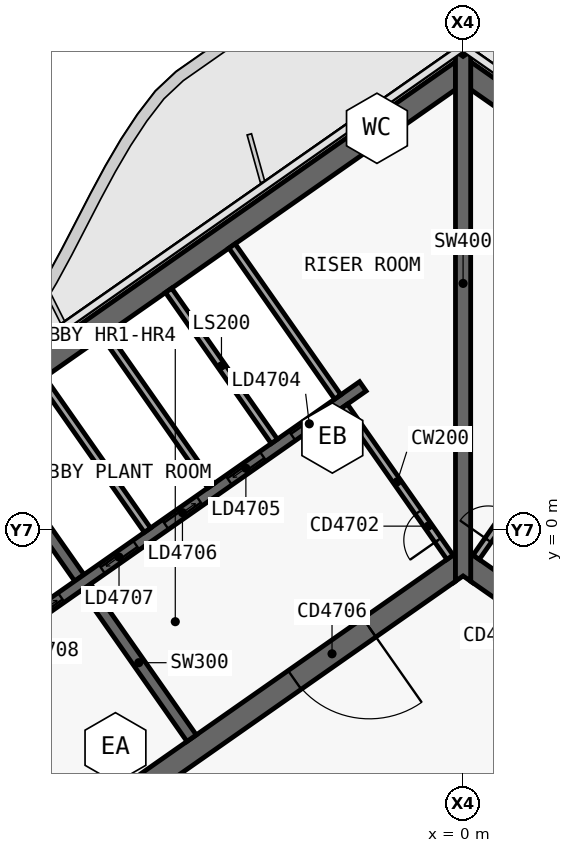
"""IFC4 building model, lengths in metres.
Left out: names, types, materials, properties, quantities, classifications, styles, units other than length and angle.
Written with IfcOpenShell. Run it as: python <this file> out.ifc"""

import sys

from ifc_helpers import new_model, si_unit, direction, frame, frame_2d, origin, place, context, subcontext, project, spatial, polyline, rectangle, outline, extrude, element, fill, save


model = new_model("IFC4")
c1 = context("Model", 3, precision=1e-05, world=origin(), true_north=direction((0.0, 1.0)))
c2 = subcontext(c1, "Body", "Model", "MODEL_VIEW")
j1 = project(units=[si_unit("LENGTHUNIT", "METRE"), si_unit("PLANEANGLEUNIT", "RADIAN")], contexts=[c1])
p1 = place(None, origin())
s1 = spatial("IfcSite", under=j1, at=p1, CompositionType="ELEMENT")
p2 = place(p1, origin())
s2 = spatial("IfcBuilding", under=s1, at=p2, CompositionType="ELEMENT")
p3 = place(p2, frame((0.0, 0.0, 264.4)))
s3 = spatial("IfcBuildingStorey", under=s2, at=p3, CompositionType="ELEMENT", Elevation=264.4)
p4 = place(p3, frame((-0.028, 12.066, 0.0), z_axis=(0.0, 0.0, 1.0), x_axis=(-0.819151382952, -0.573577380837, 0.0)))
e1 = element("IfcWall", 1, at=p4, inside=s3, PredefinedType="SHEAR", context=c2, shape_type="SweptSolid", body=[
    extrude(outline(polyline([(33.898, 0.3), (0.42, 0.3), (0.0, -0.3), (33.898, -0.3), (33.898, 0.3)])), origin(), (0.0, 0.0, 1.0), 3.9),
])
p5 = place(p3, frame((-0.028, -0.874, 0.0), z_axis=(0.0, 0.0, 1.0), x_axis=(-0.819150035022, -0.573579305871, 0.0)))
e2 = element("IfcWall", 2, at=p5, inside=s3, PredefinedType="SHEAR", context=c2, shape_type="SweptSolid", body=[
    extrude(outline(polyline([(26.476, 0.3), (0.42, 0.3), (0.0, -0.3), (26.476, -0.3), (26.476, 0.3)])), origin(), (0.0, 0.0, 1.0), 3.9),
])
p6 = place(p5, frame((2.976, 0.0, 0.0)))
e3 = element("IfcOpeningElement", 3, at=p6, cuts=e2, PredefinedType="OPENING", context=c2, shape_type="SweptSolid", body=[
    extrude(rectangle(XDim=2.4, YDim=2.1, at=frame_2d((1.2, 1.05))), frame((0.0, 0.31, 0.0), z_axis=(0.0, -1.0, 0.0), x_axis=(1.0, 0.0, 0.0)), (0.0, 0.0, 1.0), 0.62),
])
p7 = place(p5, frame((11.776, 0.0, 0.0)))
e4 = element("IfcOpeningElement", 4, at=p7, cuts=e2, PredefinedType="OPENING", context=c2, shape_type="SweptSolid", body=[
    extrude(rectangle(XDim=2.4, YDim=2.1, at=frame_2d((1.2, 1.05))), frame((0.0, 0.31, 0.0), z_axis=(0.0, -1.0, 0.0), x_axis=(1.0, 0.0, 0.0)), (0.0, 0.0, 1.0), 0.62),
])
p8 = place(p3, frame((-7.143, -5.49, 0.0), z_axis=(0.0, 0.0, 1.0), x_axis=(-0.573617744349, 0.819123118565, 0.0)))
e5 = element("IfcWall", 5, at=p8, inside=s3, PredefinedType="SHEAR", context=c2, shape_type="SweptSolid", body=[
    extrude(outline(polyline([(4.85, 0.15), (0.0, 0.15), (0.0, -0.15), (4.85, -0.15), (4.85, 0.15)])), origin(), (0.0, 0.0, 1.0), 3.9),
])
p9 = place(p3, frame((-10.097, -1.271, 0.0), z_axis=(0.0, 0.0, 1.0), x_axis=(-0.573560315113, 0.819163332265, 0.0)))
e6 = element("IfcWall", 6, at=p9, inside=s3, PredefinedType="SHEAR", context=c2, shape_type="SweptSolid", body=[
    extrude(outline(polyline([(4.85, -0.15), (4.85, 0.15), (0.0, 0.15), (0.0, -0.15), (4.85, -0.15)])), origin(), (0.0, 0.0, 1.0), 3.9),
])
p10 = place(p3, frame((-2.638, 3.768, 0.0), z_axis=(0.0, 0.0, 1.0), x_axis=(-0.819155014212, -0.573572194837, 0.0)))
e7 = element("IfcWall", 7, at=p10, inside=s3, PredefinedType="SHEAR", context=c2, shape_type="SweptSolid", body=[
    extrude(outline(polyline([(26.4, 0.15), (0.0, 0.15), (0.0, -0.15), (26.4, -0.15), (26.4, 0.15)])), origin(), (0.0, 0.0, 1.0), 3.9),
])
p11 = place(p10, frame((1.169, 0.0, 0.0)))
e8 = element("IfcOpeningElement", 8, at=p11, cuts=e7, PredefinedType="OPENING", context=c2, shape_type="SweptSolid", body=[
    extrude(rectangle(XDim=1.1, YDim=2.1, at=frame_2d((0.55, 1.05))), frame((0.0, 0.16, 0.0), z_axis=(0.0, -1.0, 0.0), x_axis=(1.0, 0.0, 0.0)), (0.0, 0.0, 1.0), 0.32),
])
p12 = place(p10, frame((3.206, 0.0, 0.0)))
e9 = element("IfcOpeningElement", 9, at=p12, cuts=e7, PredefinedType="OPENING", context=c2, shape_type="SweptSolid", body=[
    extrude(rectangle(XDim=1.1, YDim=2.1, at=frame_2d((0.55, 1.05))), frame((0.0, 0.16, 0.0), z_axis=(0.0, -1.0, 0.0), x_axis=(1.0, 0.0, 0.0)), (0.0, 0.0, 1.0), 0.32),
])
p13 = place(p10, frame((5.244, 0.0, 0.0)))
e10 = element("IfcOpeningElement", 10, at=p13, cuts=e7, PredefinedType="OPENING", context=c2, shape_type="SweptSolid", body=[
    extrude(rectangle(XDim=1.1, YDim=2.1, at=frame_2d((0.55, 1.05))), frame((0.0, 0.16, 0.0), z_axis=(0.0, -1.0, 0.0), x_axis=(1.0, 0.0, 0.0)), (0.0, 0.0, 1.0), 0.32),
])
p14 = place(p10, frame((7.281, 0.0, 0.0)))
e11 = element("IfcOpeningElement", 11, at=p14, cuts=e7, PredefinedType="OPENING", context=c2, shape_type="SweptSolid", body=[
    extrude(rectangle(XDim=1.1, YDim=2.1, at=frame_2d((0.55, 1.05))), frame((0.0, 0.16, 0.0), z_axis=(0.0, -1.0, 0.0), x_axis=(1.0, 0.0, 0.0)), (0.0, 0.0, 1.0), 0.32),
])
p15 = place(p10, frame((9.688, 0.0, 0.0)))
e12 = element("IfcOpeningElement", 12, at=p15, cuts=e7, PredefinedType="OPENING", context=c2, shape_type="SweptSolid", body=[
    extrude(rectangle(XDim=1.1, YDim=2.1, at=frame_2d((0.55, 1.05))), frame((0.0, 0.16, 0.0), z_axis=(0.0, -1.0, 0.0), x_axis=(1.0, 0.0, 0.0)), (0.0, 0.0, 1.0), 0.32),
])
p16 = place(p10, frame((11.863, 0.0, 0.0)))
e13 = element("IfcOpeningElement", 13, at=p16, cuts=e7, PredefinedType="OPENING", context=c2, shape_type="SweptSolid", body=[
    extrude(rectangle(XDim=1.1, YDim=2.1, at=frame_2d((0.55, 1.05))), frame((0.0, 0.16, 0.0), z_axis=(0.0, -1.0, 0.0), x_axis=(1.0, 0.0, 0.0)), (0.0, 0.0, 1.0), 0.32),
])
p17 = place(p10, frame((14.552, 0.0, 0.0)))
e14 = element("IfcOpeningElement", 14, at=p17, cuts=e7, PredefinedType="OPENING", context=c2, shape_type="SweptSolid", body=[
    extrude(rectangle(XDim=1.0, YDim=2.1, at=frame_2d((0.5, 1.05))), frame((0.0, 0.16, 0.0), z_axis=(0.0, -1.0, 0.0), x_axis=(1.0, 0.0, 0.0)), (0.0, 0.0, 1.0), 0.32),
])
p18 = place(p10, frame((16.627, 0.0, 0.0)))
e15 = element("IfcOpeningElement", 15, at=p18, cuts=e7, PredefinedType="OPENING", context=c2, shape_type="SweptSolid", body=[
    extrude(rectangle(XDim=1.0, YDim=2.1, at=frame_2d((0.5, 1.05))), frame((0.0, 0.16, 0.0), z_axis=(0.0, -1.0, 0.0), x_axis=(1.0, 0.0, 0.0)), (0.0, 0.0, 1.0), 0.32),
])
p19 = place(p3, frame((0.028, 12.066, 0.0), z_axis=(0.0, 0.0, 1.0), x_axis=(0.819151382952, -0.573577380837, 0.0)))
e16 = element("IfcWall", 16, at=p19, inside=s3, PredefinedType="SHEAR", context=c2, shape_type="SweptSolid", body=[
    extrude(outline(polyline([(33.898, 0.3), (0.0, 0.3), (0.42, -0.3), (33.898, -0.3), (33.898, 0.3)])), origin(), (0.0, 0.0, 1.0), 3.9),
])
p20 = place(p3, frame((0.028, -0.874, 0.0), z_axis=(0.0, 0.0, 1.0), x_axis=(0.819150035022, -0.573579305871, 0.0)))
e17 = element("IfcWall", 17, at=p20, inside=s3, PredefinedType="SHEAR", context=c2, shape_type="SweptSolid", body=[
    extrude(outline(polyline([(26.476, 0.3), (0.0, 0.3), (0.42, -0.3), (26.476, -0.3), (26.476, 0.3)])), origin(), (0.0, 0.0, 1.0), 3.9),
])
p21 = place(p20, frame((6.576, 0.0, 0.0)))
e18 = element("IfcOpeningElement", 18, at=p21, cuts=e17, PredefinedType="OPENING", context=c2, shape_type="SweptSolid", body=[
    extrude(rectangle(XDim=1.5, YDim=2.1, at=frame_2d((0.75, 1.05))), frame((0.0, 0.31, 0.0), z_axis=(0.0, -1.0, 0.0), x_axis=(1.0, 0.0, 0.0)), (0.0, 0.0, 1.0), 0.62),
])
p22 = place(p20, frame((12.226, 0.0, 0.0)))
e19 = element("IfcOpeningElement", 19, at=p22, cuts=e17, PredefinedType="OPENING", context=c2, shape_type="SweptSolid", body=[
    extrude(rectangle(XDim=1.5, YDim=2.1, at=frame_2d((0.75, 1.05))), frame((0.0, 0.31, 0.0), z_axis=(0.0, -1.0, 0.0), x_axis=(1.0, 0.0, 0.0)), (0.0, 0.0, 1.0), 0.62),
])
p23 = place(p3, frame((0.0, -1.361, 0.0), z_axis=(0.0, 0.0, 1.0), x_axis=(0.0, 1.0, 0.0)))
e20 = element("IfcWall", 20, at=p23, inside=s3, PredefinedType="SHEAR", context=c2, shape_type="SweptSolid", body=[
    extrude(outline(polyline([(0.14, 0.2), (0.0, 0.2), (0.14, 0.0), (0.0, -0.2), (0.14, -0.2), (1.012, -0.2), (12.94, -0.2), (13.813, -0.2), (13.893, -0.2), (13.933, -0.172), (13.813, 0.0), (13.933, 0.172), (13.893, 0.2), (13.813, 0.2), (12.94, 0.2), (1.012, 0.2), (0.14, 0.2)])), origin(), (0.0, 0.0, 1.0), 3.9),
])
p24 = place(p3, frame((-4.967, 2.321, 0.0), z_axis=(0.0, 0.0, 1.0), x_axis=(-0.573594092424, 0.81913968109, 0.0)))
e21 = element("IfcWall", 21, at=p24, inside=s3, PredefinedType="SOLIDWALL", context=c2, shape_type="SweptSolid", body=[
    extrude(rectangle(XDim=4.85, YDim=0.2, at=frame_2d((2.425, 0.0))), origin(), (0.0, 0.0, 1.0), 3.9),
])
p25 = place(p3, frame((-6.636, 1.152, 0.0), z_axis=(0.0, 0.0, 1.0), x_axis=(-0.573560315113, 0.819163332265, 0.0)))
e22 = element("IfcWall", 22, at=p25, inside=s3, PredefinedType="SOLIDWALL", context=c2, shape_type="SweptSolid", body=[
    extrude(rectangle(XDim=4.85, YDim=0.2, at=frame_2d((2.425, 0.0))), origin(), (0.0, 0.0, 1.0), 3.9),
])
p26 = place(p3, frame((-8.305, -0.017, 0.0), z_axis=(0.0, 0.0, 1.0), x_axis=(-0.573594092424, 0.81913968109, 0.0)))
e23 = element("IfcWall", 23, at=p26, inside=s3, PredefinedType="SOLIDWALL", context=c2, shape_type="SweptSolid", body=[
    extrude(rectangle(XDim=4.85, YDim=0.2, at=frame_2d((2.425, 0.0))), origin(), (0.0, 0.0, 1.0), 3.9),
])
p27 = place(p3, frame((-0.344, -0.729, 0.0), z_axis=(0.0, 0.0, 1.0), x_axis=(-0.573560315113, 0.819163332265, 0.0)))
e24 = element("IfcWall", 24, at=p27, inside=s3, PredefinedType="SOLIDWALL", context=c2, shape_type="SweptSolid", body=[
    extrude(rectangle(XDim=4.85, YDim=0.2, at=frame_2d((2.425, 0.0))), origin(), (0.0, 0.0, 1.0), 3.62),
])
p28 = place(p27, frame((0.55, 0.0, 0.0)))
e25 = element("IfcOpeningElement", 25, at=p28, cuts=e24, PredefinedType="OPENING", context=c2, shape_type="SweptSolid", body=[
    extrude(rectangle(XDim=0.9, YDim=2.1, at=frame_2d((0.45, 1.05))), frame((0.0, 0.11, 0.0), z_axis=(0.0, -1.0, 0.0), x_axis=(1.0, 0.0, 0.0)), (0.0, 0.0, 1.0), 0.22),
])
p29 = place(p3, frame((-3.298, 3.49, 0.0), z_axis=(0.0, 0.0, 1.0), x_axis=(-0.573560315113, 0.819163332265, 0.0)))
e26 = element("IfcWall", 26, at=p29, inside=s3, PredefinedType="SOLIDWALL", context=c2, shape_type="SweptSolid", body=[
    extrude(rectangle(XDim=4.85, YDim=0.2, at=frame_2d((2.425, 0.0))), origin(), (0.0, 0.0, 1.0), 3.62),
])
p30 = place(p3, frame((0.344, -0.729, 0.0), z_axis=(0.0, 0.0, 1.0), x_axis=(0.573560315113, 0.819163332265, 0.0)))
e27 = element("IfcWall", 27, at=p30, inside=s3, PredefinedType="SOLIDWALL", context=c2, shape_type="SweptSolid", body=[
    extrude(rectangle(XDim=4.85, YDim=0.2, at=frame_2d((2.425, 0.0))), origin(), (0.0, 0.0, 1.0), 3.62),
])
p31 = place(p30, frame((0.55, 0.0, 0.0)))
e28 = element("IfcOpeningElement", 28, at=p31, cuts=e27, PredefinedType="OPENING", context=c2, shape_type="SweptSolid", body=[
    extrude(rectangle(XDim=0.9, YDim=2.1, at=frame_2d((0.45, 1.05))), frame((0.0, 0.11, 0.0), z_axis=(0.0, -1.0, 0.0), x_axis=(1.0, 0.0, 0.0)), (0.0, 0.0, 1.0), 0.22),
])
p32 = place(p11, origin())
e29 = element("IfcDoor", 29, at=p32, inside=s3, OperationType="SLIDING_TO_LEFT", PredefinedType="DOOR", context=c2, shape_type="SweptSolid", body=[
    extrude(rectangle(XDim=1.1, YDim=2.1, at=frame_2d((0.55, 1.05))), frame((0.0, 0.025, 0.0), z_axis=(0.0, -1.0, 0.0), x_axis=(1.0, 0.0, 0.0)), (0.0, 0.0, 1.0), 0.05),
])
fill(e8, e29)
p33 = place(p12, origin())
e30 = element("IfcDoor", 30, at=p33, inside=s3, OperationType="SLIDING_TO_RIGHT", PredefinedType="DOOR", context=c2, shape_type="SweptSolid", body=[
    extrude(rectangle(XDim=1.1, YDim=2.1, at=frame_2d((0.55, 1.05))), frame((0.0, 0.025, 0.0), z_axis=(0.0, -1.0, 0.0), x_axis=(1.0, 0.0, 0.0)), (0.0, 0.0, 1.0), 0.05),
])
fill(e9, e30)
p34 = place(p13, origin())
e31 = element("IfcDoor", 31, at=p34, inside=s3, OperationType="SLIDING_TO_LEFT", PredefinedType="DOOR", context=c2, shape_type="SweptSolid", body=[
    extrude(rectangle(XDim=1.1, YDim=2.1, at=frame_2d((0.55, 1.05))), frame((0.0, 0.025, 0.0), z_axis=(0.0, -1.0, 0.0), x_axis=(1.0, 0.0, 0.0)), (0.0, 0.0, 1.0), 0.05),
])
fill(e10, e31)
p35 = place(p14, origin())
e32 = element("IfcDoor", 32, at=p35, inside=s3, OperationType="SLIDING_TO_RIGHT", PredefinedType="DOOR", context=c2, shape_type="SweptSolid", body=[
    extrude(rectangle(XDim=1.1, YDim=2.1, at=frame_2d((0.55, 1.05))), frame((0.0, 0.025, 0.0), z_axis=(0.0, -1.0, 0.0), x_axis=(1.0, 0.0, 0.0)), (0.0, 0.0, 1.0), 0.05),
])
fill(e11, e32)
p36 = place(p15, origin())
e33 = element("IfcDoor", 33, at=p36, inside=s3, OperationType="SLIDING_TO_LEFT", PredefinedType="DOOR", context=c2, shape_type="SweptSolid", body=[
    extrude(rectangle(XDim=1.1, YDim=2.1, at=frame_2d((0.55, 1.05))), frame((0.0, 0.025, 0.0), z_axis=(0.0, -1.0, 0.0), x_axis=(1.0, 0.0, 0.0)), (0.0, 0.0, 1.0), 0.05),
])
fill(e12, e33)
p37 = place(p6, origin())
e34 = element("IfcDoor", 34, at=p37, inside=s3, OperationType="DOUBLE_DOOR_SINGLE_SWING", PredefinedType="DOOR", context=c2, shape_type="SweptSolid", body=[
    extrude(rectangle(XDim=2.4, YDim=2.1, at=frame_2d((1.2, 1.05))), frame((0.0, 0.025, 0.0), z_axis=(0.0, -1.0, 0.0), x_axis=(1.0, 0.0, 0.0)), (0.0, 0.0, 1.0), 0.05),
])
fill(e3, e34)
p38 = place(p28, origin())
e35 = element("IfcDoor", 35, at=p38, inside=s3, OperationType="SINGLE_SWING_RIGHT", PredefinedType="DOOR", context=c2, shape_type="SweptSolid", body=[
    extrude(rectangle(XDim=0.9, YDim=2.1, at=frame_2d((0.45, 1.05))), frame((0.0, 0.025, 0.0), z_axis=(0.0, -1.0, 0.0), x_axis=(1.0, 0.0, 0.0)), (0.0, 0.0, 1.0), 0.05),
])
fill(e25, e35)
p39 = place(p31, origin())
e36 = element("IfcDoor", 36, at=p39, inside=s3, OperationType="SINGLE_SWING_RIGHT", PredefinedType="DOOR", context=c2, shape_type="SweptSolid", body=[
    extrude(rectangle(XDim=0.9, YDim=2.1, at=frame_2d((0.45, 1.05))), frame((0.0, 0.025, 0.0), z_axis=(0.0, -1.0, 0.0), x_axis=(1.0, 0.0, 0.0)), (0.0, 0.0, 1.0), 0.05),
])
fill(e28, e36)
save(model, sys.argv[1])
